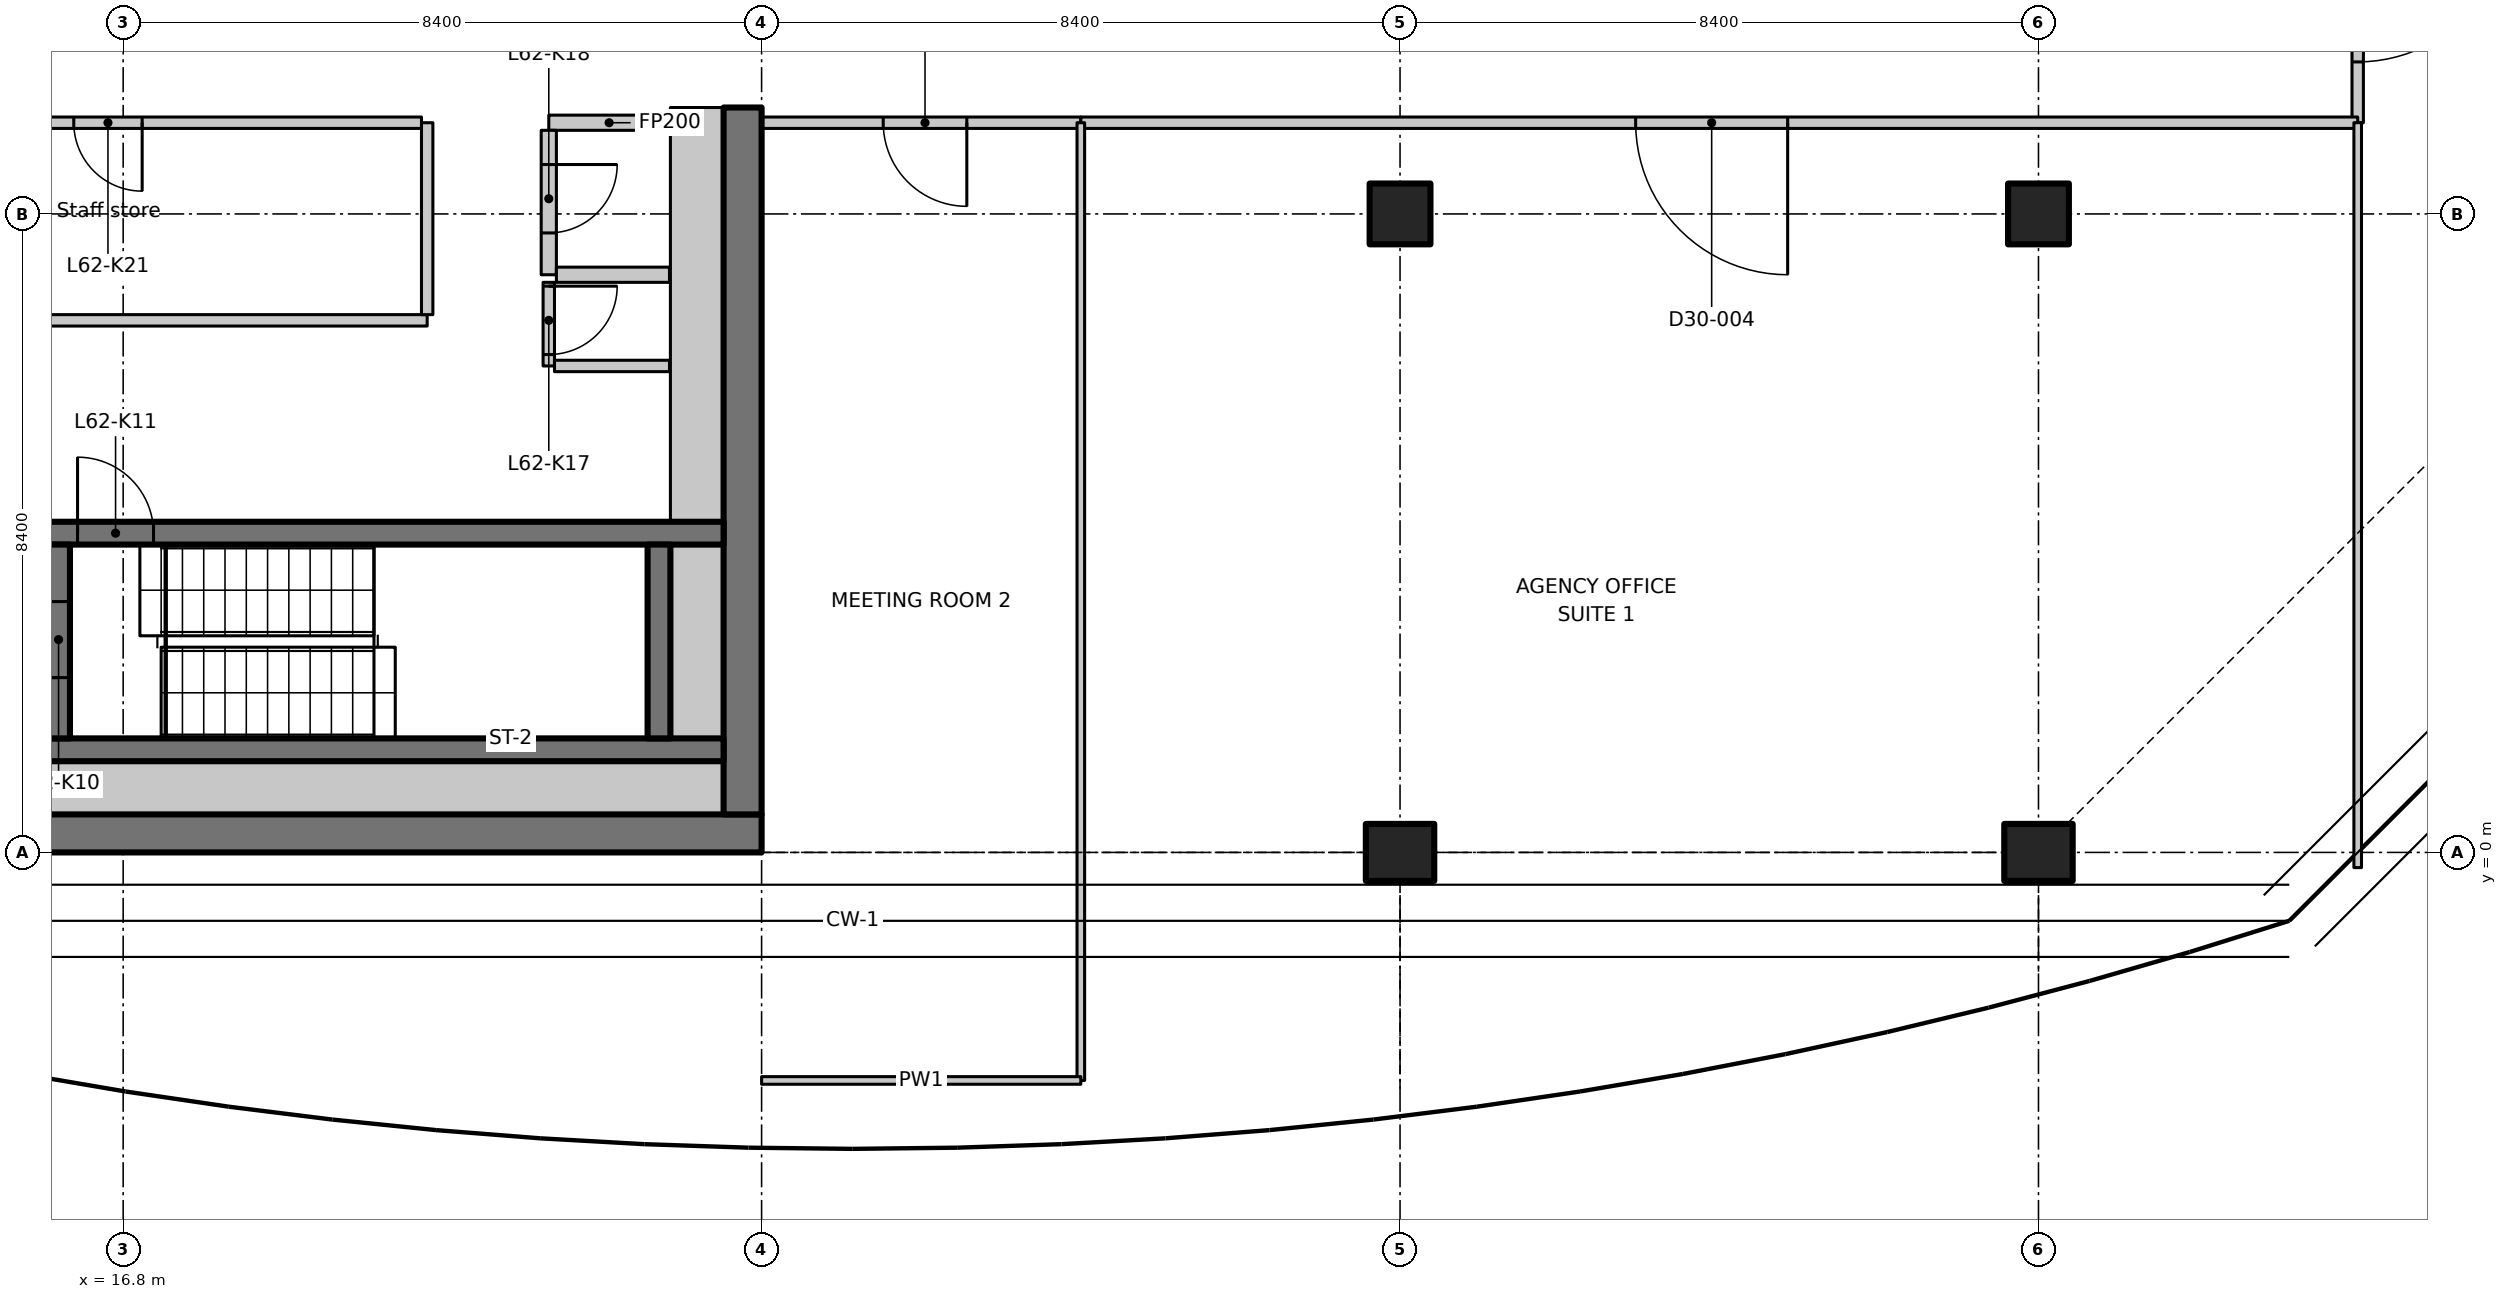
"""IFC4 building model, lengths in metres.
Left out: names, types, materials, properties, quantities, classifications, styles, units other than length and angle.
Written with IfcOpenShell. Run it as: python <this file> out.ifc"""

import sys

from ifc_helpers import new_model, si_unit, direction, frame, frame_2d, origin, origin_2d, place, context, subcontext, project, spatial, polyline, rectangle, outline, extrude, element, fill, save


model = new_model("IFC4")
c1 = context("Model", 3, precision=1e-05, world=origin(), true_north=direction((0.0, 1.0)))
c2 = subcontext(c1, "Body", "Model", "MODEL_VIEW")
j1 = project(units=[si_unit("LENGTHUNIT", "METRE"), si_unit("PLANEANGLEUNIT", "RADIAN")], contexts=[c1])
p1 = place(None, origin())
s1 = spatial("IfcSite", under=j1, at=p1, CompositionType="ELEMENT")
p2 = place(p1, origin())
s2 = spatial("IfcBuilding", under=s1, at=p2, CompositionType="ELEMENT")
p3 = place(p2, frame((0.0, 0.0, 244.5)))
s3 = spatial("IfcBuildingStorey", under=s2, at=p3, CompositionType="ELEMENT", Elevation=244.5)
p4 = place(p3, frame((33.6, 0.0, 0.0), z_axis=(0.0, 0.0, 1.0), x_axis=(0.0, 1.0, 0.0)))
e1 = element("IfcColumn", 1, at=p4, inside=s3, PredefinedType="COLUMN", context=c2, shape_type="SweptSolid", body=[
    extrude(rectangle(XDim=0.75, YDim=0.9, at=origin_2d()), origin(), (0.0, 0.0, 1.0), 3.35),
])
p5 = place(p3, frame((33.6, 8.4, 0.0), z_axis=(0.0, 0.0, 1.0), x_axis=(1.0, 0.0, 0.0)))
e2 = element("IfcColumn", 2, at=p5, inside=s3, PredefinedType="COLUMN", context=c2, shape_type="SweptSolid", body=[
    extrude(rectangle(XDim=0.8, YDim=0.8, at=origin_2d()), origin(), (0.0, 0.0, 1.0), 3.35),
])
p6 = place(p3, frame((42.0, 0.0, 0.0), z_axis=(0.0, 0.0, 1.0), x_axis=(0.0, 1.0, 0.0)))
e3 = element("IfcColumn", 3, at=p6, inside=s3, PredefinedType="COLUMN", context=c2, shape_type="SweptSolid", body=[
    extrude(rectangle(XDim=0.75, YDim=0.9, at=origin_2d()), origin(), (0.0, 0.0, 1.0), 3.35),
])
p7 = place(p3, frame((42.0, 8.4, 0.0), z_axis=(0.0, 0.0, 1.0), x_axis=(1.0, 0.0, 0.0)))
e4 = element("IfcColumn", 4, at=p7, inside=s3, PredefinedType="COLUMN", context=c2, shape_type="SweptSolid", body=[
    extrude(rectangle(XDim=0.8, YDim=0.8, at=origin_2d()), origin(), (0.0, 0.0, 1.0), 3.35),
])
p8 = place(p3, frame((7.436, 0.25, 0.0), z_axis=(0.0, 0.0, 1.0), x_axis=(1.0, 0.0, 0.0)))
e5 = element("IfcWall", 5, at=p8, inside=s3, PredefinedType="SHEAR", context=c2, shape_type="SweptSolid", body=[
    extrude(rectangle(XDim=17.764, YDim=0.5, at=frame_2d((8.882, 0.0))), origin(), (0.0, 0.0, 1.0), 3.35),
])
p9 = place(p3, frame((24.95, 0.5, 0.0), z_axis=(0.0, 0.0, 1.0), x_axis=(0.0, 1.0, 0.0)))
e6 = element("IfcWall", 6, at=p9, inside=s3, PredefinedType="SHEAR", context=c2, shape_type="SweptSolid", body=[
    extrude(rectangle(XDim=9.3, YDim=0.5, at=frame_2d((4.65, 0.0))), origin(), (0.0, 0.0, 1.0), 3.35),
])
p10 = place(p3, frame((15.8, 1.35, 0.0), z_axis=(0.0, 0.0, 1.0), x_axis=(1.0, 0.0, 0.0)))
e7 = element("IfcWall", 7, at=p10, inside=s3, PredefinedType="SHEAR", context=c2, shape_type="SweptSolid", body=[
    extrude(rectangle(XDim=8.9, YDim=0.3, at=frame_2d((4.45, 0.0))), origin(), (0.0, 0.0, 1.0), 3.35),
])
p11 = place(p3, frame((15.8, 4.2, 0.0), z_axis=(0.0, 0.0, 1.0), x_axis=(1.0, 0.0, 0.0)))
e8 = element("IfcWall", 8, at=p11, inside=s3, PredefinedType="SHEAR", context=c2, shape_type="SweptSolid", body=[
    extrude(rectangle(XDim=8.9, YDim=0.3, at=frame_2d((4.45, 0.0))), origin(), (0.0, 0.0, 1.0), 3.35),
])
p12 = place(p11, frame((0.4, 0.0, 0.0)))
e9 = element("IfcOpeningElement", 9, at=p12, cuts=e8, PredefinedType="OPENING", context=c2, shape_type="SweptSolid", body=[
    extrude(rectangle(XDim=1.0, YDim=2.1, at=frame_2d((0.5, 1.05))), frame((0.0, 0.16, 0.0), z_axis=(0.0, -1.0, 0.0), x_axis=(1.0, 0.0, 0.0)), (0.0, 0.0, 1.0), 0.32),
])
p13 = place(p3, frame((15.95, 1.5, 0.0), z_axis=(0.0, 0.0, 1.0), x_axis=(0.0, 1.0, 0.0)))
e10 = element("IfcWall", 10, at=p13, inside=s3, PredefinedType="SHEAR", context=c2, shape_type="SweptSolid", body=[
    extrude(rectangle(XDim=2.55, YDim=0.3, at=frame_2d((1.275, 0.0))), origin(), (0.0, 0.0, 1.0), 3.35),
])
p14 = place(p13, frame((0.8, 0.0, 0.0)))
e11 = element("IfcOpeningElement", 11, at=p14, cuts=e10, PredefinedType="OPENING", context=c2, shape_type="SweptSolid", body=[
    extrude(rectangle(XDim=1.0, YDim=2.1, at=frame_2d((0.5, 1.05))), frame((0.0, 0.16, 0.0), z_axis=(0.0, -1.0, 0.0), x_axis=(1.0, 0.0, 0.0)), (0.0, 0.0, 1.0), 0.32),
])
p15 = place(p3, frame((23.85, 1.5, 0.0), z_axis=(0.0, 0.0, 1.0), x_axis=(0.0, 1.0, 0.0)))
e12 = element("IfcWall", 12, at=p15, inside=s3, PredefinedType="SHEAR", context=c2, shape_type="SweptSolid", body=[
    extrude(rectangle(XDim=2.55, YDim=0.3, at=frame_2d((1.275, 0.0))), origin(), (0.0, 0.0, 1.0), 3.35),
])
p16 = place(p3, frame((23.988, 9.6, 0.0), z_axis=(0.0, 0.0, 1.0), x_axis=(-1.0, 0.0, 0.0)))
e13 = element("IfcWall", 13, at=p16, inside=s3, PredefinedType="PARTITIONING", context=c2, shape_type="SweptSolid", body=[
    extrude(rectangle(XDim=1.588, YDim=0.2, at=frame_2d((0.794, 0.0))), origin(), (0.0, 0.0, 1.0), 3.35),
])
p17 = place(p3, frame((22.4, 9.5, 0.0), z_axis=(0.0, 0.0, 1.0), x_axis=(0.0, -1.0, 0.0)))
e14 = element("IfcWall", 14, at=p17, inside=s3, PredefinedType="PARTITIONING", context=c2, shape_type="SweptSolid", body=[
    extrude(rectangle(XDim=1.9, YDim=0.2, at=frame_2d((0.95, 0.0))), origin(), (0.0, 0.0, 1.0), 3.35),
])
p18 = place(p17, frame((0.45, 0.0, 0.0)))
e15 = element("IfcOpeningElement", 15, at=p18, cuts=e14, PredefinedType="OPENING", context=c2, shape_type="SweptSolid", body=[
    extrude(rectangle(XDim=0.9, YDim=2.1, at=frame_2d((0.45, 1.05))), frame((0.0, 0.11, 0.0), z_axis=(0.0, -1.0, 0.0), x_axis=(1.0, 0.0, 0.0)), (0.0, 0.0, 1.0), 0.22),
])
p19 = place(p3, frame((22.5, 7.6, 0.0), z_axis=(0.0, 0.0, 1.0), x_axis=(1.0, 0.0, 0.0)))
e16 = element("IfcWall", 16, at=p19, inside=s3, PredefinedType="PARTITIONING", context=c2, shape_type="SweptSolid", body=[
    extrude(rectangle(XDim=1.488, YDim=0.2, at=frame_2d((0.744, 0.0))), origin(), (0.0, 0.0, 1.0), 3.35),
])
p20 = place(p3, frame((12.5, 7.0, 0.0), z_axis=(0.0, 0.0, 1.0), x_axis=(1.0, 0.0, 0.0)))
e17 = element("IfcWall", 17, at=p20, inside=s3, PredefinedType="PARTITIONING", context=c2, shape_type="SweptSolid", body=[
    extrude(rectangle(XDim=8.3, YDim=0.15, at=frame_2d((4.15, 0.0))), origin(), (0.0, 0.0, 1.0), 3.35),
])
p21 = place(p3, frame((20.8, 7.075, 0.0), z_axis=(0.0, 0.0, 1.0), x_axis=(0.0, 1.0, 0.0)))
e18 = element("IfcWall", 18, at=p21, inside=s3, PredefinedType="PARTITIONING", context=c2, shape_type="SweptSolid", body=[
    extrude(rectangle(XDim=2.525, YDim=0.15, at=frame_2d((1.263, 0.0))), origin(), (0.0, 0.0, 1.0), 3.35),
])
p22 = place(p3, frame((20.725, 9.6, 0.0), z_axis=(0.0, 0.0, 1.0), x_axis=(-1.0, 0.0, 0.0)))
e19 = element("IfcWall", 19, at=p22, inside=s3, PredefinedType="PARTITIONING", context=c2, shape_type="SweptSolid", body=[
    extrude(rectangle(XDim=8.225, YDim=0.15, at=frame_2d((4.113, 0.0))), origin(), (0.0, 0.0, 1.0), 3.35),
])
p23 = place(p22, frame((3.675, 0.0, 0.0)))
e20 = element("IfcOpeningElement", 20, at=p23, cuts=e19, PredefinedType="OPENING", context=c2, shape_type="SweptSolid", body=[
    extrude(rectangle(XDim=0.9, YDim=2.1, at=frame_2d((0.45, 1.05))), frame((0.0, 0.085, 0.0), z_axis=(0.0, -1.0, 0.0), x_axis=(1.0, 0.0, 0.0)), (0.0, 0.0, 1.0), 0.17),
])
p24 = place(p3, frame((22.4, 7.5, 0.0), z_axis=(0.0, 0.0, 1.0), x_axis=(0.0, -1.0, 0.0)))
e21 = element("IfcWall", 21, at=p24, inside=s3, PredefinedType="PARTITIONING", context=c2, shape_type="SweptSolid", body=[
    extrude(rectangle(XDim=1.1, YDim=0.15, at=frame_2d((0.55, 0.0))), origin(), (0.0, 0.0, 1.0), 3.35),
])
p25 = place(p24, frame((0.05, 0.0, 0.0)))
e22 = element("IfcOpeningElement", 22, at=p25, cuts=e21, PredefinedType="OPENING", context=c2, shape_type="SweptSolid", body=[
    extrude(rectangle(XDim=0.9, YDim=2.1, at=frame_2d((0.45, 1.05))), frame((0.0, 0.085, 0.0), z_axis=(0.0, -1.0, 0.0), x_axis=(1.0, 0.0, 0.0)), (0.0, 0.0, 1.0), 0.17),
])
p26 = place(p3, frame((22.475, 6.4, 0.0), z_axis=(0.0, 0.0, 1.0), x_axis=(1.0, 0.0, 0.0)))
e23 = element("IfcWall", 23, at=p26, inside=s3, PredefinedType="PARTITIONING", context=c2, shape_type="SweptSolid", body=[
    extrude(rectangle(XDim=1.513, YDim=0.15, at=frame_2d((0.756, 0.0))), origin(), (0.0, 0.0, 1.0), 3.35),
])
p27 = place(p3, frame((13.35, 0.85, 0.0), z_axis=(0.0, 0.0, 1.0), x_axis=(1.0, 0.0, 0.0)))
e24 = element("IfcWall", 24, at=p27, inside=s3, PredefinedType="PARTITIONING", context=c2, shape_type="SweptSolid", body=[
    extrude(rectangle(XDim=11.35, YDim=0.7, at=frame_2d((5.675, 0.0))), origin(), (0.0, 0.0, 1.0), 3.35),
])
p28 = place(p3, frame((24.35, 1.5, 0.0), z_axis=(0.0, 0.0, 1.0), x_axis=(0.0, 1.0, 0.0)))
e25 = element("IfcWall", 25, at=p28, inside=s3, PredefinedType="PARTITIONING", context=c2, shape_type="SweptSolid", body=[
    extrude(rectangle(XDim=2.55, YDim=0.7, at=frame_2d((1.275, 0.0))), origin(), (0.0, 0.0, 1.0), 3.35),
])
p29 = place(p3, frame((24.35, 4.35, 0.0), z_axis=(0.0, 0.0, 1.0), x_axis=(0.0, 1.0, 0.0)))
e26 = element("IfcWall", 26, at=p29, inside=s3, PredefinedType="PARTITIONING", context=c2, shape_type="SweptSolid", body=[
    extrude(rectangle(XDim=5.45, YDim=0.7, at=frame_2d((2.725, 0.0))), origin(), (0.0, 0.0, 1.0), 3.35),
])
p30 = place(p3, frame((29.4, 9.6, 0.0), z_axis=(0.0, 0.0, 1.0), x_axis=(-1.0, 0.0, 0.0)))
e27 = element("IfcWall", 27, at=p30, inside=s3, PredefinedType="PARTITIONING", context=c2, shape_type="SweptSolid", body=[
    extrude(rectangle(XDim=4.2, YDim=0.15, at=frame_2d((2.1, 0.0))), origin(), (0.0, 0.0, 1.0), 3.33),
])
p31 = place(p30, frame((1.5, 0.0, 0.0)))
e28 = element("IfcOpeningElement", 28, at=p31, cuts=e27, PredefinedType="OPENING", context=c2, shape_type="SweptSolid", body=[
    extrude(rectangle(XDim=1.1, YDim=2.1, at=frame_2d((0.55, 1.05))), frame((0.0, 0.085, 0.0), z_axis=(0.0, -1.0, 0.0), x_axis=(1.0, 0.0, 0.0)), (0.0, 0.0, 1.0), 0.17),
])
p32 = place(p3, frame((46.2, 13.0, 0.0), z_axis=(0.0, 0.0, 1.0), x_axis=(0.0, -1.0, 0.0)))
e29 = element("IfcWall", 29, at=p32, inside=s3, PredefinedType="PARTITIONING", context=c2, shape_type="SweptSolid", body=[
    extrude(rectangle(XDim=3.4, YDim=0.15, at=frame_2d((1.7, 0.0))), origin(), (0.0, 0.0, 1.0), 3.33),
])
p33 = place(p32, frame((0.6, 0.0, 0.0)))
e30 = element("IfcOpeningElement", 30, at=p33, cuts=e29, PredefinedType="OPENING", context=c2, shape_type="SweptSolid", body=[
    extrude(rectangle(XDim=2.0, YDim=2.4, at=frame_2d((1.0, 1.2))), frame((0.0, 0.085, 0.0), z_axis=(0.0, -1.0, 0.0), x_axis=(1.0, 0.0, 0.0)), (0.0, 0.0, 1.0), 0.17),
])
p34 = place(p3, frame((46.2, 9.6, 0.0), z_axis=(0.0, 0.0, 1.0), x_axis=(-1.0, 0.0, 0.0)))
e31 = element("IfcWall", 31, at=p34, inside=s3, PredefinedType="PARTITIONING", context=c2, shape_type="SweptSolid", body=[
    extrude(rectangle(XDim=16.8, YDim=0.15, at=frame_2d((8.4, 0.0))), origin(), (0.0, 0.0, 1.0), 3.33),
])
p35 = place(p34, frame((7.5, 0.0, 0.0)))
e32 = element("IfcOpeningElement", 32, at=p35, cuts=e31, PredefinedType="OPENING", context=c2, shape_type="SweptSolid", body=[
    extrude(rectangle(XDim=2.0, YDim=2.4, at=frame_2d((1.0, 1.2))), frame((0.0, 0.085, 0.0), z_axis=(0.0, -1.0, 0.0), x_axis=(1.0, 0.0, 0.0)), (0.0, 0.0, 1.0), 0.17),
])
p36 = place(p3, frame((46.2, -0.2, 0.0), z_axis=(0.0, 0.0, 1.0), x_axis=(0.0, 1.0, 0.0)))
e33 = element("IfcWall", 33, at=p36, inside=s3, PredefinedType="PARTITIONING", context=c2, shape_type="SweptSolid", body=[
    extrude(outline(polyline([(0.0, 0.0), (9.8, 0.0), (9.8, 3.33), (5.066, 3.33), (5.064, 2.98), (3.736, 2.98), (3.734, 3.33), (0.0, 3.33), (0.0, 0.0)])), frame((0.0, 0.05, 0.0), z_axis=(0.0, -1.0, 0.0), x_axis=(1.0, 0.0, 0.0)), (0.0, 0.0, 1.0), 0.1),
])
p37 = place(p3, frame((29.4, 9.6, 0.0), z_axis=(0.0, 0.0, 1.0), x_axis=(0.0, -1.0, 0.0)))
e34 = element("IfcWall", 34, at=p37, inside=s3, PredefinedType="PARTITIONING", context=c2, shape_type="SweptSolid", body=[
    extrude(outline(polyline([(0.0, 0.0), (12.6, 0.0), (12.6, 3.33), (10.05, 3.33), (10.048, 2.98), (9.152, 2.98), (9.15, 3.33), (0.0, 3.33), (0.0, 0.0)])), frame((0.0, 0.05, 0.0), z_axis=(0.0, -1.0, 0.0), x_axis=(1.0, 0.0, 0.0)), (0.0, 0.0, 1.0), 0.1),
])
p38 = place(p3, frame((29.4, -3.0, 0.0), z_axis=(0.0, 0.0, 1.0), x_axis=(-1.0, 0.0, 0.0)))
e35 = element("IfcWall", 35, at=p38, inside=s3, PredefinedType="PARTITIONING", context=c2, shape_type="SweptSolid", body=[
    extrude(rectangle(XDim=4.2, YDim=0.1, at=frame_2d((2.1, 0.0))), origin(), (0.0, 0.0, 1.0), 3.33),
])
p39 = place(p14, origin())
e36 = element("IfcDoor", 36, at=p39, inside=s3, OperationType="SINGLE_SWING_RIGHT", PredefinedType="DOOR", context=c2, shape_type="SweptSolid", body=[
    extrude(rectangle(XDim=1.0, YDim=2.1, at=frame_2d((0.5, 1.05))), frame((0.0, 0.025, 0.0), z_axis=(0.0, -1.0, 0.0), x_axis=(1.0, 0.0, 0.0)), (0.0, 0.0, 1.0), 0.05),
])
fill(e11, e36)
p40 = place(p12, origin())
e37 = element("IfcDoor", 37, at=p40, inside=s3, OperationType="SINGLE_SWING_LEFT", PredefinedType="DOOR", context=c2, shape_type="SweptSolid", body=[
    extrude(rectangle(XDim=1.0, YDim=2.1, at=frame_2d((0.5, 1.05))), frame((0.0, 0.025, 0.0), z_axis=(0.0, -1.0, 0.0), x_axis=(1.0, 0.0, 0.0)), (0.0, 0.0, 1.0), 0.05),
])
fill(e9, e37)
p41 = place(p25, origin())
e38 = element("IfcDoor", 38, at=p41, inside=s3, OperationType="SINGLE_SWING_LEFT", PredefinedType="DOOR", context=c2, shape_type="SweptSolid", body=[
    extrude(rectangle(XDim=0.9, YDim=2.1, at=frame_2d((0.45, 1.05))), frame((0.0, 0.025, 0.0), z_axis=(0.0, -1.0, 0.0), x_axis=(1.0, 0.0, 0.0)), (0.0, 0.0, 1.0), 0.05),
])
fill(e22, e38)
p42 = place(p18, origin())
e39 = element("IfcDoor", 39, at=p42, inside=s3, OperationType="SINGLE_SWING_RIGHT", PredefinedType="DOOR", context=c2, shape_type="SweptSolid", body=[
    extrude(rectangle(XDim=0.9, YDim=2.1, at=frame_2d((0.45, 1.05))), frame((0.0, 0.025, 0.0), z_axis=(0.0, -1.0, 0.0), x_axis=(1.0, 0.0, 0.0)), (0.0, 0.0, 1.0), 0.05),
])
fill(e15, e39)
p43 = place(p23, origin())
e40 = element("IfcDoor", 40, at=p43, inside=s3, OperationType="SINGLE_SWING_LEFT", PredefinedType="DOOR", context=c2, shape_type="SweptSolid", body=[
    extrude(rectangle(XDim=0.9, YDim=2.1, at=frame_2d((0.45, 1.05))), frame((0.0, 0.025, 0.0), z_axis=(0.0, -1.0, 0.0), x_axis=(1.0, 0.0, 0.0)), (0.0, 0.0, 1.0), 0.05),
])
fill(e20, e40)
p44 = place(p33, origin())
e41 = element("IfcDoor", 41, at=p44, inside=s3, OperationType="DOUBLE_DOOR_SINGLE_SWING", PredefinedType="DOOR", context=c2, shape_type="SweptSolid", body=[
    extrude(rectangle(XDim=2.0, YDim=2.4, at=frame_2d((1.0, 1.2))), frame((0.0, 0.025, 0.0), z_axis=(0.0, -1.0, 0.0), x_axis=(1.0, 0.0, 0.0)), (0.0, 0.0, 1.0), 0.05),
])
fill(e30, e41)
p45 = place(p31, origin())
e42 = element("IfcDoor", 42, at=p45, inside=s3, OperationType="SINGLE_SWING_LEFT", PredefinedType="DOOR", context=c2, shape_type="SweptSolid", body=[
    extrude(rectangle(XDim=1.1, YDim=2.1, at=frame_2d((0.55, 1.05))), frame((0.0, 0.025, 0.0), z_axis=(0.0, -1.0, 0.0), x_axis=(1.0, 0.0, 0.0)), (0.0, 0.0, 1.0), 0.05),
])
fill(e28, e42)
p46 = place(p35, origin())
e43 = element("IfcDoor", 43, at=p46, inside=s3, OperationType="DOUBLE_DOOR_SINGLE_SWING", PredefinedType="DOOR", context=c2, shape_type="SweptSolid", body=[
    extrude(rectangle(XDim=2.0, YDim=2.4, at=frame_2d((1.0, 1.2))), frame((0.0, 0.025, 0.0), z_axis=(0.0, -1.0, 0.0), x_axis=(1.0, 0.0, 0.0)), (0.0, 0.0, 1.0), 0.05),
])
fill(e32, e43)
save(model, sys.argv[1])
